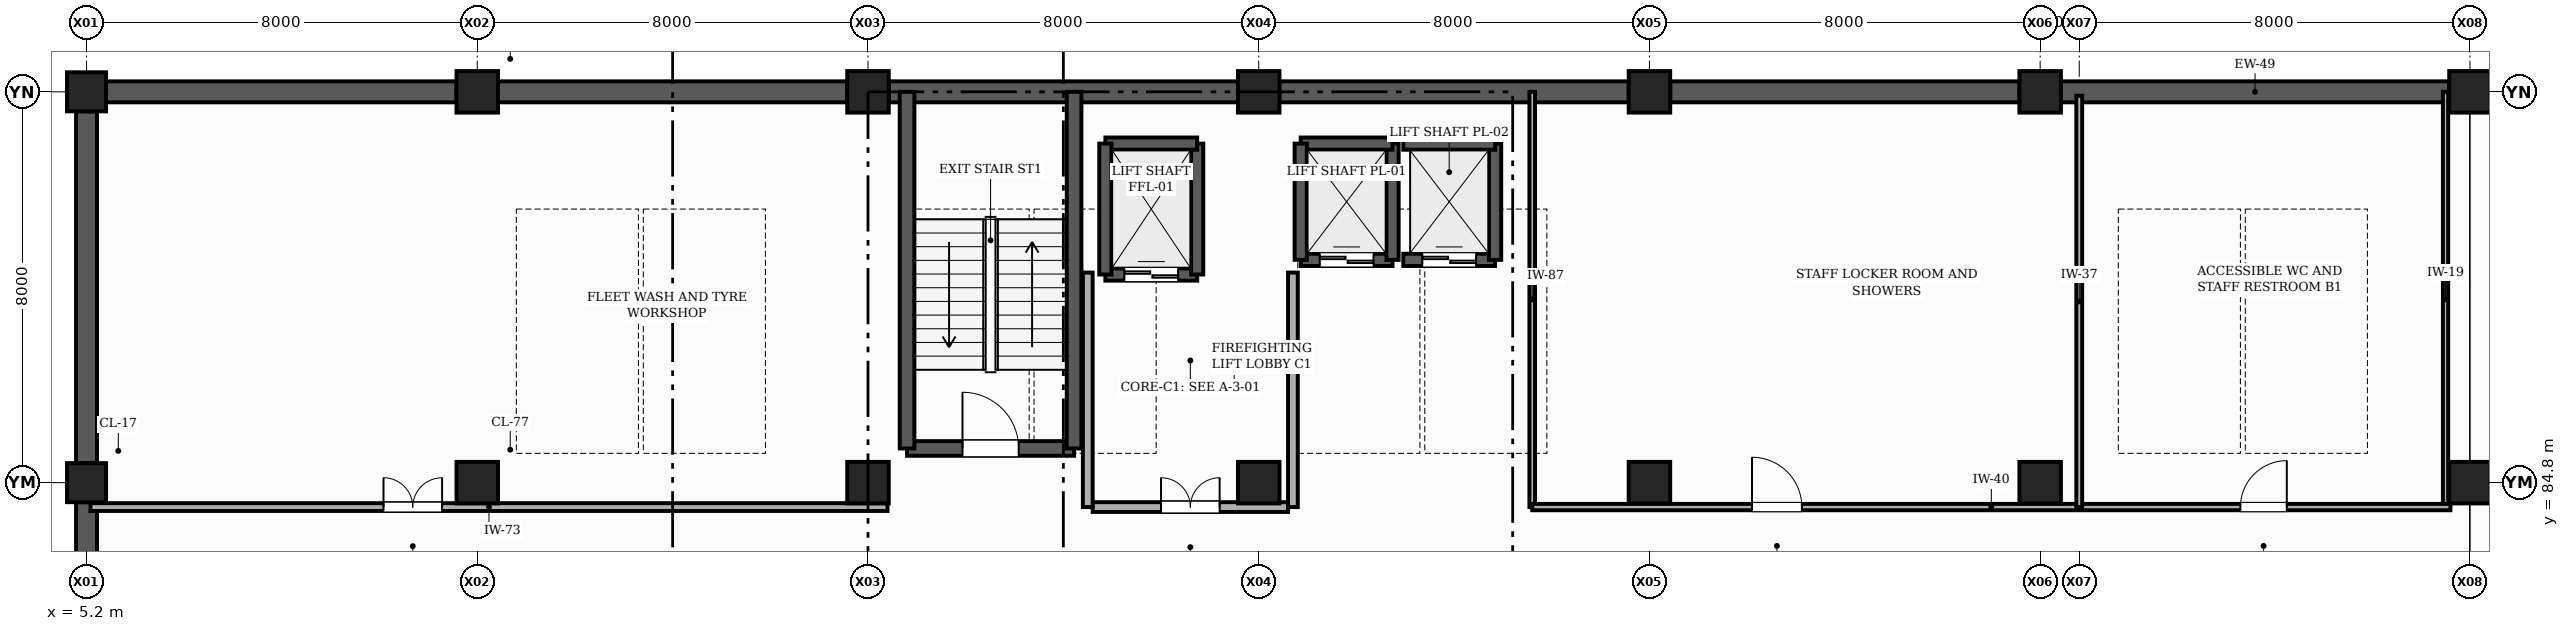
"""IFC4 building model, lengths in metres.
Left out: names, types, materials, properties, quantities, classifications, styles, units other than length and angle.
Written with IfcOpenShell. Run it as: python <this file> out.ifc"""

import sys

from ifc_helpers import new_model, si_unit, direction, frame, frame_2d, origin, origin_2d, place, context, subcontext, project, spatial, rectangle, extrude, element, fill, save


model = new_model("IFC4")
c1 = context("Model", 3, precision=1e-05, world=origin(), true_north=direction((0.0, 1.0)))
c2 = subcontext(c1, "Body", "Model", "MODEL_VIEW")
j1 = project(units=[si_unit("LENGTHUNIT", "METRE"), si_unit("PLANEANGLEUNIT", "RADIAN")], contexts=[c1])
p1 = place(None, origin())
s1 = spatial("IfcSite", under=j1, at=p1, CompositionType="ELEMENT")
p2 = place(p1, origin())
s2 = spatial("IfcBuilding", under=s1, at=p2, CompositionType="ELEMENT")
p3 = place(p2, frame((0.0, 0.0, -4.2)))
s3 = spatial("IfcBuildingStorey", under=s2, at=p3, CompositionType="ELEMENT", Elevation=-4.2)
for number, where, z_axis, x_axis in (
    (1, (5.2, 84.8, -0.52), (0.0, 0.0, 1.0), (1.0, 0.0, 0.0)),
    (2, (5.2, 92.8, -0.52), (0.0, 0.0, 1.0), (1.0, 0.0, 0.0)),
):
    element("IfcColumn", number, at=place(p3, frame(where, z_axis=z_axis, x_axis=x_axis)), inside=s3, PredefinedType="COLUMN", context=c2, shape_type="SweptSolid", body=[
        extrude(rectangle(XDim=0.8, YDim=0.8, at=origin_2d()), origin(), (0.0, 0.0, 1.0), 4.72),
    ])
for number, where, z_axis, x_axis in (
    (3, (13.2, 84.8, -0.52), (0.0, 0.0, 1.0), (1.0, 0.0, 0.0)),
    (4, (13.2, 92.8, -0.52), (0.0, 0.0, 1.0), (1.0, 0.0, 0.0)),
    (5, (21.2, 84.8, -0.52), (0.0, 0.0, 1.0), (1.0, 0.0, 0.0)),
    (6, (21.2, 92.8, -0.52), (0.0, 0.0, 1.0), (1.0, 0.0, 0.0)),
    (7, (29.2, 84.8, -0.52), (0.0, 0.0, 1.0), (1.0, 0.0, 0.0)),
    (8, (29.2, 92.8, -0.52), (0.0, 0.0, 1.0), (1.0, 0.0, 0.0)),
    (9, (37.2, 84.8, -0.52), (0.0, 0.0, 1.0), (1.0, 0.0, 0.0)),
    (10, (37.2, 92.8, -0.52), (0.0, 0.0, 1.0), (1.0, 0.0, 0.0)),
    (11, (45.2, 84.8, -0.52), (0.0, 0.0, 1.0), (1.0, 0.0, 0.0)),
    (12, (45.2, 92.8, -0.52), (0.0, 0.0, 1.0), (1.0, 0.0, 0.0)),
    (13, (54.0, 84.8, -0.52), (0.0, 0.0, 1.0), (1.0, 0.0, 0.0)),
    (14, (54.0, 92.8, -0.52), (0.0, 0.0, 1.0), (1.0, 0.0, 0.0)),
):
    element("IfcColumn", number, at=place(p3, frame(where, z_axis=z_axis, x_axis=x_axis)), inside=s3, PredefinedType="COLUMN", context=c2, shape_type="SweptSolid", body=[
        extrude(rectangle(XDim=0.85, YDim=0.85, at=origin_2d()), origin(), (0.0, 0.0, 1.0), 4.72),
    ])
p4 = place(p3, frame((53.575, 92.8, -0.44), z_axis=(0.0, 0.0, 1.0), x_axis=(-1.0, 0.0, 0.0)))
e15 = element("IfcWall", 15, at=p4, inside=s3, PredefinedType="SOLIDWALL", context=c2, shape_type="SweptSolid", body=[
    extrude(rectangle(XDim=7.95, YDim=0.43, at=frame_2d((3.975, 0.0))), origin(), (0.0, 0.0, 1.0), 3.47),
])
for number, where, z_axis, x_axis in (
    (16, (44.775, 92.8, -0.44), (0.0, 0.0, 1.0), (-1.0, 0.0, 0.0)),
    (17, (36.775, 92.8, -0.44), (0.0, 0.0, 1.0), (-1.0, 0.0, 0.0)),
):
    element("IfcWall", number, at=place(p3, frame(where, z_axis=z_axis, x_axis=x_axis)), inside=s3, PredefinedType="SOLIDWALL", context=c2, shape_type="SweptSolid", body=[
        extrude(rectangle(XDim=7.15, YDim=0.43, at=frame_2d((3.575, 0.0))), origin(), (0.0, 0.0, 1.0), 3.47),
    ])
p5 = place(p3, frame((28.775, 92.8, -0.44), z_axis=(0.0, 0.0, 1.0), x_axis=(-1.0, 0.0, 0.0)))
e18 = element("IfcWall", 18, at=p5, inside=s3, PredefinedType="SOLIDWALL", context=c2, shape_type="SweptSolid", body=[
    extrude(rectangle(XDim=7.15, YDim=0.43, at=frame_2d((3.575, 0.0))), origin(), (0.0, 0.0, 1.0), 4.22),
])
p6 = place(p3, frame((20.775, 92.8, -0.44), z_axis=(0.0, 0.0, 1.0), x_axis=(-1.0, 0.0, 0.0)))
e19 = element("IfcWall", 19, at=p6, inside=s3, PredefinedType="SOLIDWALL", context=c2, shape_type="SweptSolid", body=[
    extrude(rectangle(XDim=7.15, YDim=0.43, at=frame_2d((3.575, 0.0))), origin(), (0.0, 0.0, 1.0), 3.47),
])
p7 = place(p3, frame((12.775, 92.8, -0.44), z_axis=(0.0, 0.0, 1.0), x_axis=(-1.0, 0.0, 0.0)))
e20 = element("IfcWall", 20, at=p7, inside=s3, PredefinedType="SOLIDWALL", context=c2, shape_type="SweptSolid", body=[
    extrude(rectangle(XDim=7.175, YDim=0.43, at=frame_2d((3.587, 0.0))), origin(), (0.0, 0.0, 1.0), 3.47),
])
for number, where, z_axis, x_axis in (
    (21, (5.2, 92.4, -0.44), (0.0, 0.0, 1.0), (0.0, -1.0, 0.0)),
    (22, (5.2, 84.4, -0.44), (0.0, 0.0, 1.0), (0.0, -1.0, 0.0)),
):
    element("IfcWall", number, at=place(p3, frame(where, z_axis=z_axis, x_axis=x_axis)), inside=s3, PredefinedType="SOLIDWALL", context=c2, shape_type="SweptSolid", body=[
        extrude(rectangle(XDim=7.2, YDim=0.43, at=frame_2d((3.6, 0.0))), origin(), (0.0, 0.0, 1.0), 3.57),
    ])
p8 = place(p3, frame((22.0, 85.5, -0.52), z_axis=(0.0, 0.0, 1.0), x_axis=(1.0, 0.0, 0.0)))
e23 = element("IfcWall", 23, at=p8, inside=s3, PredefinedType="SHEAR", context=c2, shape_type="SweptSolid", body=[
    extrude(rectangle(XDim=3.42, YDim=0.3, at=frame_2d((1.71, 0.0))), origin(), (0.0, 0.0, 1.0), 4.72),
])
p9 = place(p8, frame((1.135, 0.0, 0.52)))
e24 = element("IfcOpeningElement", 24, at=p9, cuts=e23, PredefinedType="OPENING", context=c2, shape_type="SweptSolid", body=[
    extrude(rectangle(XDim=1.15, YDim=2.15, at=frame_2d((0.575, 1.075))), frame((0.0, 0.16, 0.0), z_axis=(0.0, -1.0, 0.0), x_axis=(1.0, 0.0, 0.0)), (0.0, 0.0, 1.0), 0.32),
])
for number, where, z_axis, x_axis in (
    (25, (25.42, 85.5, -0.52), (0.0, 0.0, 1.0), (0.0, 1.0, 0.0)),
    (26, (22.0, 92.8, -0.52), (0.0, 0.0, 1.0), (0.0, -1.0, 0.0)),
):
    element("IfcWall", number, at=place(p3, frame(where, z_axis=z_axis, x_axis=x_axis)), inside=s3, PredefinedType="SHEAR", context=c2, shape_type="SweptSolid", body=[
        extrude(rectangle(XDim=7.3, YDim=0.3, at=frame_2d((3.65, 0.0))), origin(), (0.0, 0.0, 1.0), 4.72),
    ])
p10 = place(p3, frame((26.06, 89.06, -0.5), z_axis=(0.0, 0.0, 1.0), x_axis=(1.0, 0.0, 0.0)))
e27 = element("IfcWall", 27, at=p10, inside=s3, PredefinedType="SHEAR", context=c2, shape_type="SweptSolid", body=[
    extrude(rectangle(XDim=1.88, YDim=0.25, at=frame_2d((0.94, 0.0))), origin(), (0.0, 0.0, 1.0), 4.7),
])
p11 = place(p10, frame((0.39, 0.0, 0.5)))
e28 = element("IfcOpeningElement", 28, at=p11, cuts=e27, PredefinedType="OPENING", context=c2, shape_type="SweptSolid", body=[
    extrude(rectangle(XDim=1.1, YDim=2.2, at=frame_2d((0.55, 1.1))), frame((0.0, 0.135, 0.0), z_axis=(0.0, -1.0, 0.0), x_axis=(1.0, 0.0, 0.0)), (0.0, 0.0, 1.0), 0.27),
])
p12 = place(p3, frame((27.94, 89.06, -0.5), z_axis=(0.0, 0.0, 1.0), x_axis=(0.0, 1.0, 0.0)))
e29 = element("IfcWall", 29, at=p12, inside=s3, PredefinedType="SHEAR", context=c2, shape_type="SweptSolid", body=[
    extrude(rectangle(XDim=2.68, YDim=0.25, at=frame_2d((1.34, 0.0))), origin(), (0.0, 0.0, 1.0), 4.7),
])
p13 = place(p3, frame((27.94, 91.74, -0.5), z_axis=(0.0, 0.0, 1.0), x_axis=(-1.0, 0.0, 0.0)))
e30 = element("IfcWall", 30, at=p13, inside=s3, PredefinedType="SHEAR", context=c2, shape_type="SweptSolid", body=[
    extrude(rectangle(XDim=1.88, YDim=0.25, at=frame_2d((0.94, 0.0))), origin(), (0.0, 0.0, 1.0), 4.7),
])
p14 = place(p3, frame((26.06, 91.74, -0.5), z_axis=(0.0, 0.0, 1.0), x_axis=(0.0, -1.0, 0.0)))
e31 = element("IfcWall", 31, at=p14, inside=s3, PredefinedType="SHEAR", context=c2, shape_type="SweptSolid", body=[
    extrude(rectangle(XDim=2.68, YDim=0.25, at=frame_2d((1.34, 0.0))), origin(), (0.0, 0.0, 1.0), 4.7),
])
p15 = place(p3, frame((30.06, 89.36, -0.5), z_axis=(0.0, 0.0, 1.0), x_axis=(1.0, 0.0, 0.0)))
e32 = element("IfcWall", 32, at=p15, inside=s3, PredefinedType="SHEAR", context=c2, shape_type="SweptSolid", body=[
    extrude(rectangle(XDim=1.88, YDim=0.25, at=frame_2d((0.94, 0.0))), origin(), (0.0, 0.0, 1.0), 4.7),
])
p16 = place(p15, frame((0.39, 0.0, 0.5)))
e33 = element("IfcOpeningElement", 33, at=p16, cuts=e32, PredefinedType="OPENING", context=c2, shape_type="SweptSolid", body=[
    extrude(rectangle(XDim=1.1, YDim=2.2, at=frame_2d((0.55, 1.1))), frame((0.0, 0.135, 0.0), z_axis=(0.0, -1.0, 0.0), x_axis=(1.0, 0.0, 0.0)), (0.0, 0.0, 1.0), 0.27),
])
p17 = place(p3, frame((31.94, 89.36, -0.5), z_axis=(0.0, 0.0, 1.0), x_axis=(0.0, 1.0, 0.0)))
e34 = element("IfcWall", 34, at=p17, inside=s3, PredefinedType="SHEAR", context=c2, shape_type="SweptSolid", body=[
    extrude(rectangle(XDim=2.38, YDim=0.25, at=frame_2d((1.19, 0.0))), origin(), (0.0, 0.0, 1.0), 4.7),
])
p18 = place(p3, frame((31.94, 91.74, -0.5), z_axis=(0.0, 0.0, 1.0), x_axis=(-1.0, 0.0, 0.0)))
e35 = element("IfcWall", 35, at=p18, inside=s3, PredefinedType="SHEAR", context=c2, shape_type="SweptSolid", body=[
    extrude(rectangle(XDim=1.88, YDim=0.25, at=frame_2d((0.94, 0.0))), origin(), (0.0, 0.0, 1.0), 4.7),
])
p19 = place(p3, frame((30.06, 91.74, -0.5), z_axis=(0.0, 0.0, 1.0), x_axis=(0.0, -1.0, 0.0)))
e36 = element("IfcWall", 36, at=p19, inside=s3, PredefinedType="SHEAR", context=c2, shape_type="SweptSolid", body=[
    extrude(rectangle(XDim=2.38, YDim=0.25, at=frame_2d((1.19, 0.0))), origin(), (0.0, 0.0, 1.0), 4.7),
])
p20 = place(p3, frame((32.16, 89.36, -0.5), z_axis=(0.0, 0.0, 1.0), x_axis=(1.0, 0.0, 0.0)))
e37 = element("IfcWall", 37, at=p20, inside=s3, PredefinedType="SHEAR", context=c2, shape_type="SweptSolid", body=[
    extrude(rectangle(XDim=1.88, YDim=0.25, at=frame_2d((0.94, 0.0))), origin(), (0.0, 0.0, 1.0), 4.7),
])
p21 = place(p20, frame((0.39, 0.0, 0.5)))
e38 = element("IfcOpeningElement", 38, at=p21, cuts=e37, PredefinedType="OPENING", context=c2, shape_type="SweptSolid", body=[
    extrude(rectangle(XDim=1.1, YDim=2.2, at=frame_2d((0.55, 1.1))), frame((0.0, 0.135, 0.0), z_axis=(0.0, -1.0, 0.0), x_axis=(1.0, 0.0, 0.0)), (0.0, 0.0, 1.0), 0.27),
])
p22 = place(p3, frame((34.04, 89.36, -0.5), z_axis=(0.0, 0.0, 1.0), x_axis=(0.0, 1.0, 0.0)))
e39 = element("IfcWall", 39, at=p22, inside=s3, PredefinedType="SHEAR", context=c2, shape_type="SweptSolid", body=[
    extrude(rectangle(XDim=2.38, YDim=0.25, at=frame_2d((1.19, 0.0))), origin(), (0.0, 0.0, 1.0), 4.7),
])
p23 = place(p3, frame((34.04, 91.74, -0.5), z_axis=(0.0, 0.0, 1.0), x_axis=(-1.0, 0.0, 0.0)))
e40 = element("IfcWall", 40, at=p23, inside=s3, PredefinedType="SHEAR", context=c2, shape_type="SweptSolid", body=[
    extrude(rectangle(XDim=1.88, YDim=0.25, at=frame_2d((0.94, 0.0))), origin(), (0.0, 0.0, 1.0), 4.7),
])
p24 = place(p3, frame((25.8, 84.3, 0.0), z_axis=(0.0, 0.0, 1.0), x_axis=(1.0, 0.0, 0.0)))
e41 = element("IfcWall", 41, at=p24, inside=s3, PredefinedType="PARTITIONING", context=c2, shape_type="SweptSolid", body=[
    extrude(rectangle(XDim=4.0, YDim=0.2, at=frame_2d((2.0, 0.0))), origin(), (0.0, 0.0, 1.0), 2.915),
])
p25 = place(p24, frame((1.4, 0.0, 0.0)))
e42 = element("IfcOpeningElement", 42, at=p25, cuts=e41, PredefinedType="OPENING", context=c2, shape_type="SweptSolid", body=[
    extrude(rectangle(XDim=1.2, YDim=2.15, at=frame_2d((0.6, 1.075))), frame((0.0, 0.11, 0.0), z_axis=(0.0, -1.0, 0.0), x_axis=(1.0, 0.0, 0.0)), (0.0, 0.0, 1.0), 0.22),
])
p26 = place(p3, frame((25.7, 84.3, 0.0), z_axis=(0.0, 0.0, 1.0), x_axis=(0.0, 1.0, 0.0)))
e43 = element("IfcWall", 43, at=p26, inside=s3, PredefinedType="PARTITIONING", context=c2, shape_type="SweptSolid", body=[
    extrude(rectangle(XDim=4.8, YDim=0.2, at=frame_2d((2.4, 0.0))), origin(), (0.0, 0.0, 1.0), 3.115),
])
p27 = place(p3, frame((29.9, 84.3, 0.0), z_axis=(0.0, 0.0, 1.0), x_axis=(0.0, 1.0, 0.0)))
e44 = element("IfcWall", 44, at=p27, inside=s3, PredefinedType="PARTITIONING", context=c2, shape_type="SweptSolid", body=[
    extrude(rectangle(XDim=4.8, YDim=0.2, at=frame_2d((2.4, 0.0))), origin(), (0.0, 0.0, 1.0), 3.165),
])
p28 = place(p3, frame((34.8, 84.3, 0.0), z_axis=(0.0, 0.0, 1.0), x_axis=(0.0, 1.0, 0.0)))
e45 = element("IfcWall", 45, at=p28, inside=s3, PredefinedType="PARTITIONING", context=c2, shape_type="SweptSolid", body=[
    extrude(rectangle(XDim=8.5, YDim=0.115, at=frame_2d((4.25, 0.0))), origin(), (0.0, 0.0, 1.0), 3.015),
])
p29 = place(p3, frame((53.5, 84.3, 0.0), z_axis=(0.0, 0.0, 1.0), x_axis=(0.0, 1.0, 0.0)))
e46 = element("IfcWall", 46, at=p29, inside=s3, PredefinedType="PARTITIONING", context=c2, shape_type="SweptSolid", body=[
    extrude(rectangle(XDim=8.5, YDim=0.108, at=frame_2d((4.25, 0.0))), origin(), (0.0, 0.0, 1.0), 2.915),
])
p30 = place(p3, frame((5.28, 84.3, 0.0), z_axis=(0.0, 0.0, 1.0), x_axis=(1.0, 0.0, 0.0)))
e47 = element("IfcWall", 47, at=p30, inside=s3, PredefinedType="PARTITIONING", context=c2, shape_type="SweptSolid", body=[
    extrude(rectangle(XDim=16.32, YDim=0.16, at=frame_2d((8.16, 0.0))), origin(), (0.0, 0.0, 1.0), 2.915),
])
p31 = place(p30, frame((6.0, 0.0, 0.0)))
e48 = element("IfcOpeningElement", 48, at=p31, cuts=e47, PredefinedType="OPENING", context=c2, shape_type="SweptSolid", body=[
    extrude(rectangle(XDim=1.2, YDim=2.15, at=frame_2d((0.6, 1.075))), frame((0.0, 0.09, 0.0), z_axis=(0.0, -1.0, 0.0), x_axis=(1.0, 0.0, 0.0)), (0.0, 0.0, 1.0), 0.18),
])
p32 = place(p3, frame((34.8, 84.3, 0.0), z_axis=(0.0, 0.0, 1.0), x_axis=(1.0, 0.0, 0.0)))
e49 = element("IfcWall", 49, at=p32, inside=s3, PredefinedType="PARTITIONING", context=c2, shape_type="SweptSolid", body=[
    extrude(rectangle(XDim=18.8, YDim=0.13, at=frame_2d((9.4, 0.0))), origin(), (0.0, 0.0, 1.0), 2.915),
])
p33 = place(p32, frame((4.5, 0.0, 0.0)))
e50 = element("IfcOpeningElement", 50, at=p33, cuts=e49, PredefinedType="OPENING", context=c2, shape_type="SweptSolid", body=[
    extrude(rectangle(XDim=1.02, YDim=2.12, at=frame_2d((0.51, 1.06))), frame((0.0, 0.075, 0.0), z_axis=(0.0, -1.0, 0.0), x_axis=(1.0, 0.0, 0.0)), (0.0, 0.0, 1.0), 0.15),
])
p34 = place(p32, frame((14.5, 0.0, 0.0)))
e51 = element("IfcOpeningElement", 51, at=p34, cuts=e49, PredefinedType="OPENING", context=c2, shape_type="SweptSolid", body=[
    extrude(rectangle(XDim=0.95, YDim=2.15, at=frame_2d((0.475, 1.075))), frame((0.0, 0.075, 0.0), z_axis=(0.0, -1.0, 0.0), x_axis=(1.0, 0.0, 0.0)), (0.0, 0.0, 1.0), 0.15),
])
p35 = place(p3, frame((46.0, 84.3, 0.0), z_axis=(0.0, 0.0, 1.0), x_axis=(0.0, 1.0, 0.0)))
e52 = element("IfcWall", 52, at=p35, inside=s3, PredefinedType="PARTITIONING", context=c2, shape_type="SweptSolid", body=[
    extrude(rectangle(XDim=8.42, YDim=0.12, at=frame_2d((4.21, 0.0))), origin(), (0.0, 0.0, 1.0), 2.915),
])
p36 = place(p9, origin())
e53 = element("IfcDoor", 53, at=p36, inside=s3, OperationType="SINGLE_SWING_LEFT", PredefinedType="DOOR", context=c2, shape_type="SweptSolid", body=[
    extrude(rectangle(XDim=1.15, YDim=2.15, at=frame_2d((0.575, 1.075))), frame((0.0, 0.025, 0.0), z_axis=(0.0, -1.0, 0.0), x_axis=(1.0, 0.0, 0.0)), (0.0, 0.0, 1.0), 0.05),
])
fill(e24, e53)
p37 = place(p11, origin())
e54 = element("IfcDoor", 54, at=p37, inside=s3, OperationType="DOUBLE_DOOR_SLIDING", PredefinedType="DOOR", context=c2, shape_type="SweptSolid", body=[
    extrude(rectangle(XDim=1.1, YDim=2.2, at=frame_2d((0.55, 1.1))), frame((0.0, 0.025, 0.0), z_axis=(0.0, -1.0, 0.0), x_axis=(1.0, 0.0, 0.0)), (0.0, 0.0, 1.0), 0.05),
])
fill(e28, e54)
p38 = place(p16, origin())
e55 = element("IfcDoor", 55, at=p38, inside=s3, OperationType="DOUBLE_DOOR_SLIDING", PredefinedType="DOOR", context=c2, shape_type="SweptSolid", body=[
    extrude(rectangle(XDim=1.1, YDim=2.2, at=frame_2d((0.55, 1.1))), frame((0.0, 0.025, 0.0), z_axis=(0.0, -1.0, 0.0), x_axis=(1.0, 0.0, 0.0)), (0.0, 0.0, 1.0), 0.05),
])
fill(e33, e55)
p39 = place(p21, origin())
e56 = element("IfcDoor", 56, at=p39, inside=s3, OperationType="DOUBLE_DOOR_SLIDING", PredefinedType="DOOR", context=c2, shape_type="SweptSolid", body=[
    extrude(rectangle(XDim=1.1, YDim=2.2, at=frame_2d((0.55, 1.1))), frame((0.0, 0.025, 0.0), z_axis=(0.0, -1.0, 0.0), x_axis=(1.0, 0.0, 0.0)), (0.0, 0.0, 1.0), 0.05),
])
fill(e38, e56)
p40 = place(p25, origin())
e57 = element("IfcDoor", 57, at=p40, inside=s3, OperationType="DOUBLE_DOOR_SINGLE_SWING", PredefinedType="DOOR", context=c2, shape_type="SweptSolid", body=[
    extrude(rectangle(XDim=1.2, YDim=2.15, at=frame_2d((0.6, 1.075))), frame((0.0, 0.025, 0.0), z_axis=(0.0, -1.0, 0.0), x_axis=(1.0, 0.0, 0.0)), (0.0, 0.0, 1.0), 0.05),
])
fill(e42, e57)
p41 = place(p31, origin())
e58 = element("IfcDoor", 58, at=p41, inside=s3, OperationType="DOUBLE_DOOR_SINGLE_SWING", PredefinedType="DOOR", context=c2, shape_type="SweptSolid", body=[
    extrude(rectangle(XDim=1.2, YDim=2.15, at=frame_2d((0.6, 1.075))), frame((0.0, 0.025, 0.0), z_axis=(0.0, -1.0, 0.0), x_axis=(1.0, 0.0, 0.0)), (0.0, 0.0, 1.0), 0.05),
])
fill(e48, e58)
p42 = place(p33, origin())
e59 = element("IfcDoor", 59, at=p42, inside=s3, OperationType="SINGLE_SWING_LEFT", PredefinedType="DOOR", context=c2, shape_type="SweptSolid", body=[
    extrude(rectangle(XDim=1.02, YDim=2.12, at=frame_2d((0.51, 1.06))), frame((0.0, 0.025, 0.0), z_axis=(0.0, -1.0, 0.0), x_axis=(1.0, 0.0, 0.0)), (0.0, 0.0, 1.0), 0.05),
])
fill(e50, e59)
p43 = place(p34, origin())
e60 = element("IfcDoor", 60, at=p43, inside=s3, OperationType="SINGLE_SWING_RIGHT", PredefinedType="DOOR", context=c2, shape_type="SweptSolid", body=[
    extrude(rectangle(XDim=0.95, YDim=2.15, at=frame_2d((0.475, 1.075))), frame((0.0, 0.025, 0.0), z_axis=(0.0, -1.0, 0.0), x_axis=(1.0, 0.0, 0.0)), (0.0, 0.0, 1.0), 0.05),
])
fill(e51, e60)
save(model, sys.argv[1])
